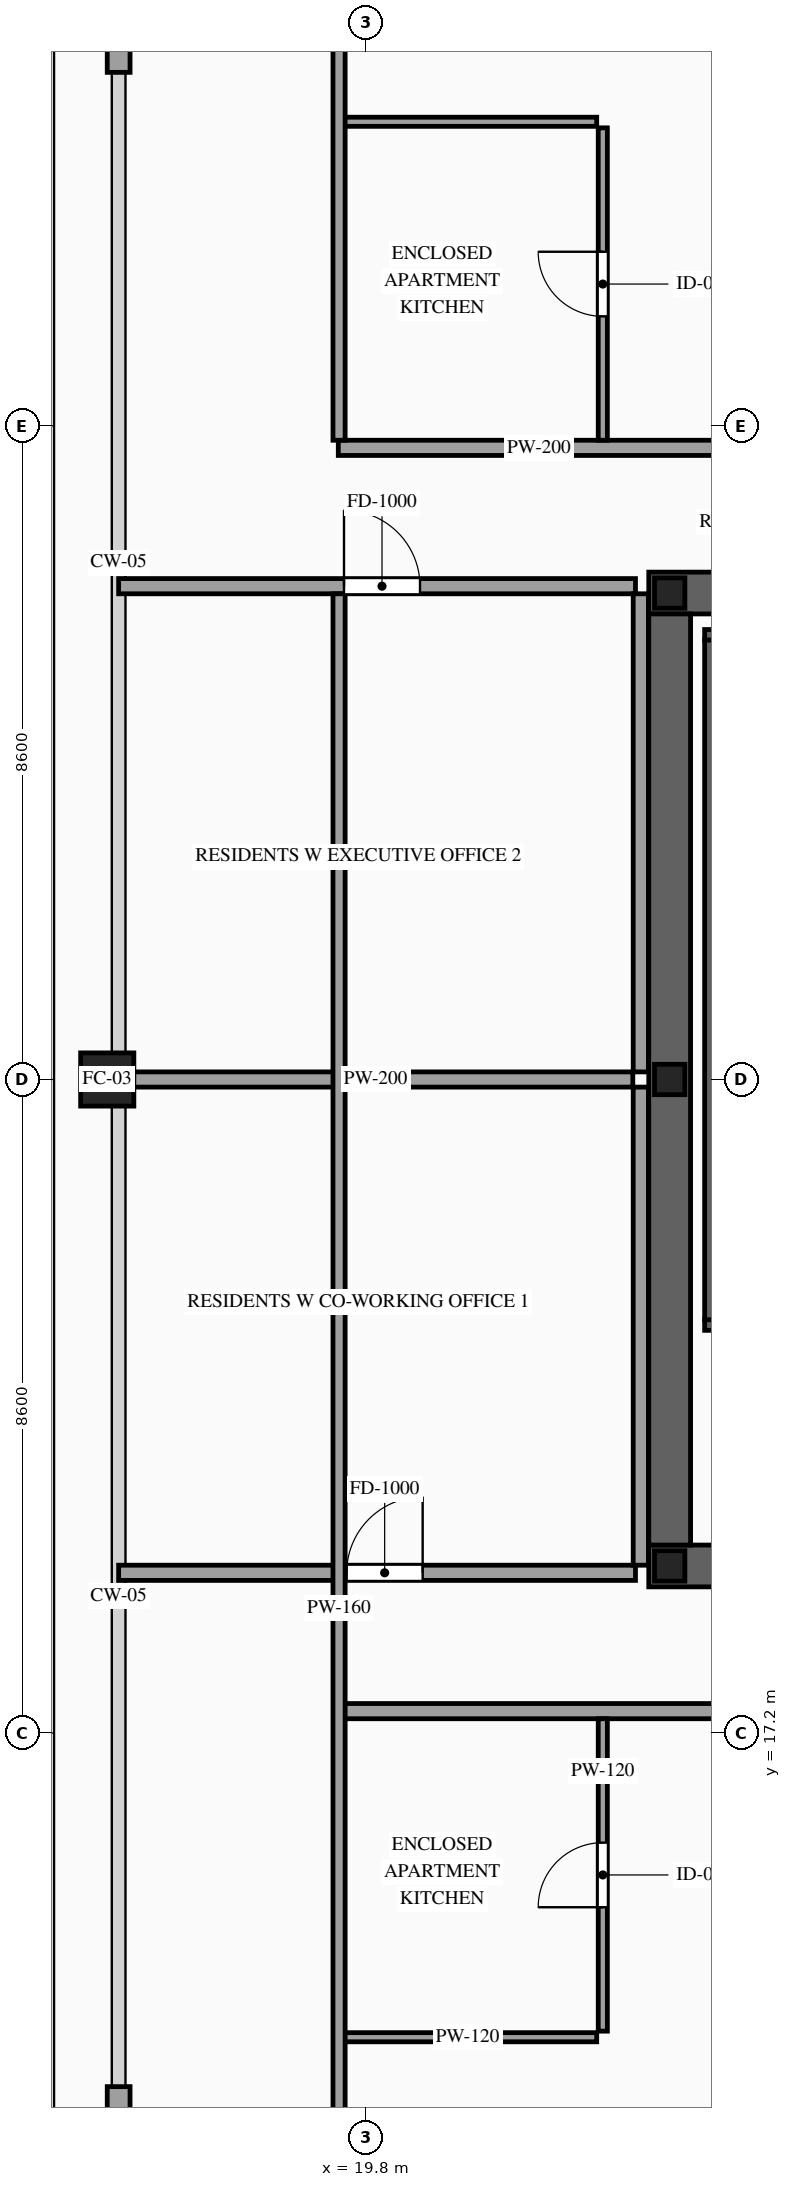
"""IFC4 building model, lengths in metres.
Left out: names, types, materials, properties, quantities, classifications, styles, units other than length and angle.
Written with IfcOpenShell. Run it as: python <this file> out.ifc"""

import sys

from ifc_helpers import new_model, si_unit, direction, frame, frame_2d, origin, origin_2d, place, context, subcontext, project, spatial, rectangle, hollow_rectangle, i_section, extrude, source, transform, mapped, element, fill, save


model = new_model("IFC4")
c1 = context("Model", 3, precision=1e-05, world=origin(), true_north=direction((0.0, 1.0)))
c2 = subcontext(c1, "Body", "Model", "MODEL_VIEW")
j1 = project(units=[si_unit("LENGTHUNIT", "METRE"), si_unit("PLANEANGLEUNIT", "RADIAN")], contexts=[c1])
p1 = place(None, origin())
s1 = spatial("IfcSite", under=j1, at=p1, CompositionType="ELEMENT")
p2 = place(p1, origin())
s2 = spatial("IfcBuilding", under=s1, at=p2, CompositionType="ELEMENT")
p3 = place(p2, frame((0.0, 0.0, 241.6)))
s3 = spatial("IfcBuildingStorey", under=s2, at=p3, CompositionType="ELEMENT", Elevation=241.6)
p4 = place(p3, frame((23.525, 19.4, 0.0), z_axis=(0.0, 0.0, 1.0), x_axis=(1.0, 0.0, 0.0)))
e1 = element("IfcWall", 1, at=p4, inside=s3, PredefinedType="SHEAR", context=c2, shape_type="SweptSolid", body=[
    extrude(rectangle(XDim=26.95, YDim=0.55, at=frame_2d((13.475, 0.0))), origin(), (0.0, 0.0, 1.0), 3.5),
])
p5 = place(p4, frame((1.925, 0.0, 0.0)))
e2 = element("IfcOpeningElement", 2, at=p5, cuts=e1, PredefinedType="OPENING", context=c2, shape_type="SweptSolid", body=[
    extrude(rectangle(XDim=1.1, YDim=2.2, at=frame_2d((0.55, 1.1))), frame((0.0, 0.29, 0.0), z_axis=(0.0, -1.0, 0.0), x_axis=(1.0, 0.0, 0.0)), (0.0, 0.0, 1.0), 0.58),
])
p6 = place(p4, frame((9.825, 0.0, 0.0)))
e3 = element("IfcOpeningElement", 3, at=p6, cuts=e1, PredefinedType="OPENING", context=c2, shape_type="SweptSolid", body=[
    extrude(rectangle(XDim=1.1, YDim=2.2, at=frame_2d((0.55, 1.1))), frame((0.0, 0.29, 0.0), z_axis=(0.0, -1.0, 0.0), x_axis=(1.0, 0.0, 0.0)), (0.0, 0.0, 1.0), 0.58),
])
p7 = place(p4, frame((23.025, 0.0, 0.0)))
e4 = element("IfcOpeningElement", 4, at=p7, cuts=e1, PredefinedType="OPENING", context=c2, shape_type="SweptSolid", body=[
    extrude(rectangle(XDim=1.1, YDim=2.2, at=frame_2d((0.55, 1.1))), frame((0.0, 0.29, 0.0), z_axis=(0.0, -1.0, 0.0), x_axis=(1.0, 0.0, 0.0)), (0.0, 0.0, 1.0), 0.58),
])
p8 = place(p4, frame((19.645, 0.0, 0.0)))
e5 = element("IfcOpeningElement", 5, at=p8, cuts=e1, PredefinedType="OPENING", context=c2, shape_type="SweptSolid", body=[
    extrude(rectangle(XDim=0.9, YDim=2.15, at=frame_2d((0.45, 1.075))), frame((0.0, 0.29, 0.0), z_axis=(0.0, -1.0, 0.0), x_axis=(1.0, 0.0, 0.0)), (0.0, 0.0, 1.0), 0.58),
])
p9 = place(p4, frame((18.205, 0.0, 0.0)))
e6 = element("IfcOpeningElement", 6, at=p9, cuts=e1, PredefinedType="OPENING", context=c2, shape_type="SweptSolid", body=[
    extrude(rectangle(XDim=0.9, YDim=2.15, at=frame_2d((0.45, 1.075))), frame((0.0, 0.29, 0.0), z_axis=(0.0, -1.0, 0.0), x_axis=(1.0, 0.0, 0.0)), (0.0, 0.0, 1.0), 0.58),
])
p10 = place(p3, frame((23.525, 32.2, 0.0), z_axis=(0.0, 0.0, 1.0), x_axis=(1.0, 0.0, 0.0)))
e7 = element("IfcWall", 7, at=p10, inside=s3, PredefinedType="SHEAR", context=c2, shape_type="SweptSolid", body=[
    extrude(rectangle(XDim=26.95, YDim=0.55, at=frame_2d((13.475, 0.0))), origin(), (0.0, 0.0, 1.0), 3.5),
])
p11 = place(p10, frame((4.545, 0.0, 0.0)))
e8 = element("IfcOpeningElement", 8, at=p11, cuts=e7, PredefinedType="OPENING", context=c2, shape_type="SweptSolid", body=[
    extrude(rectangle(XDim=0.9, YDim=2.15, at=frame_2d((0.45, 1.075))), frame((0.0, 0.29, 0.0), z_axis=(0.0, -1.0, 0.0), x_axis=(1.0, 0.0, 0.0)), (0.0, 0.0, 1.0), 0.58),
])
p12 = place(p10, frame((9.825, 0.0, 0.0)))
e9 = element("IfcOpeningElement", 9, at=p12, cuts=e7, PredefinedType="OPENING", context=c2, shape_type="SweptSolid", body=[
    extrude(rectangle(XDim=1.1, YDim=2.2, at=frame_2d((0.55, 1.1))), frame((0.0, 0.29, 0.0), z_axis=(0.0, -1.0, 0.0), x_axis=(1.0, 0.0, 0.0)), (0.0, 0.0, 1.0), 0.58),
])
p13 = place(p10, frame((15.675, 0.0, 0.0)))
e10 = element("IfcOpeningElement", 10, at=p13, cuts=e7, PredefinedType="OPENING", context=c2, shape_type="SweptSolid", body=[
    extrude(rectangle(XDim=1.1, YDim=2.2, at=frame_2d((0.55, 1.1))), frame((0.0, 0.29, 0.0), z_axis=(0.0, -1.0, 0.0), x_axis=(1.0, 0.0, 0.0)), (0.0, 0.0, 1.0), 0.58),
])
p14 = place(p10, frame((18.205, 0.0, 0.0)))
e11 = element("IfcOpeningElement", 11, at=p14, cuts=e7, PredefinedType="OPENING", context=c2, shape_type="SweptSolid", body=[
    extrude(rectangle(XDim=0.9, YDim=2.15, at=frame_2d((0.45, 1.075))), frame((0.0, 0.29, 0.0), z_axis=(0.0, -1.0, 0.0), x_axis=(1.0, 0.0, 0.0)), (0.0, 0.0, 1.0), 0.58),
])
p15 = place(p10, frame((19.645, 0.0, 0.0)))
e12 = element("IfcOpeningElement", 12, at=p15, cuts=e7, PredefinedType="OPENING", context=c2, shape_type="SweptSolid", body=[
    extrude(rectangle(XDim=0.9, YDim=2.15, at=frame_2d((0.45, 1.075))), frame((0.0, 0.29, 0.0), z_axis=(0.0, -1.0, 0.0), x_axis=(1.0, 0.0, 0.0)), (0.0, 0.0, 1.0), 0.58),
])
m1 = source(origin(), c2, "Body", "SweptSolid", [
    extrude(rectangle(XDim=12.25, YDim=0.55, at=frame_2d((6.125, 0.0))), origin(), (0.0, 0.0, 1.0), 3.5),
])
p16 = place(p3, frame((23.8, 19.675, 0.0), z_axis=(0.0, 0.0, 1.0), x_axis=(0.0, 1.0, 0.0)))
e13 = element("IfcWall", 13, at=p16, inside=s3, PredefinedType="SHEAR", context=c2, shape_type="MappedRepresentation", body=[
    mapped(m1, transform((0.0, 0.0, 0.0), scale=1.0)),
])
m2 = source(origin(), c2, "Body", "SweptSolid", [
    extrude(i_section(OverallWidth=0.4, OverallDepth=0.4, WebThickness=0.013, FlangeThickness=0.021, at=origin_2d()), origin(), (0.0, 0.0, 1.0), 3.5),
])
for number, where, z_axis, x_axis in (
    (14, (23.8, 19.4, 0.0), (0.0, 0.0, 1.0), (1.0, 0.0, 0.0)),
    (15, (23.8, 25.8, 0.0), (0.0, 0.0, 1.0), (1.0, 0.0, 0.0)),
    (16, (23.8, 32.2, 0.0), (0.0, 0.0, 1.0), (1.0, 0.0, 0.0)),
):
    element("IfcColumn", number, at=place(p3, frame(where, z_axis=z_axis, x_axis=x_axis)), inside=s3, PredefinedType="COLUMN", context=c2, shape_type="MappedRepresentation", body=[
        mapped(m2, transform((0.0, 0.0, 0.0), scale=1.0)),
    ])
m3 = source(origin(), c2, "Body", "SweptSolid", [
    extrude(hollow_rectangle(XDim=0.7, YDim=0.7, WallThickness=0.032, at=origin_2d()), origin(), (0.0, 0.0, 1.0), 3.5),
])
p17 = place(p3, frame((16.4, 25.8, 0.0), z_axis=(0.0, 0.0, 1.0), x_axis=(1.0, 0.0, 0.0)))
e17 = element("IfcColumn", 17, at=p17, inside=s3, PredefinedType="COLUMN", context=c2, shape_type="MappedRepresentation", body=[
    mapped(m3, transform((0.0, 0.0, 0.0), scale=1.0)),
])
m4 = source(origin(), c2, "Body", "SweptSolid", [
    extrude(rectangle(XDim=3.15, YDim=0.3, at=frame_2d((1.575, 0.0))), origin(), (0.0, 0.0, 1.0), 2.835),
])
p18 = place(p3, frame((16.55, 9.4, 0.0), z_axis=(0.0, 0.0, 1.0), x_axis=(0.0, 1.0, 0.0)))
e18 = element("IfcWall", 18, at=p18, inside=s3, PredefinedType="SOLIDWALL", context=c2, shape_type="MappedRepresentation", body=[
    mapped(m4, transform((0.0, 0.0, 0.0), scale=1.0)),
])
m5 = source(origin(), c2, "Body", "SweptSolid", [
    extrude(rectangle(XDim=3.15, YDim=0.3, at=frame_2d((1.575, 0.0))), origin(), (0.0, 0.0, 1.0), 2.835),
])
p19 = place(p3, frame((16.55, 39.05, 0.0), z_axis=(0.0, 0.0, 1.0), x_axis=(0.0, 1.0, 0.0)))
e19 = element("IfcWall", 19, at=p19, inside=s3, PredefinedType="SOLIDWALL", context=c2, shape_type="MappedRepresentation", body=[
    mapped(m5, transform((0.0, 0.0, 0.0), scale=1.0)),
])
p20 = place(p3, frame((24.26, 22.57, 0.0), z_axis=(0.0, 0.0, 1.0), x_axis=(1.0, 0.0, 0.0)))
e20 = element("IfcWall", 20, at=p20, inside=s3, PredefinedType="SOLIDWALL", context=c2, shape_type="SweptSolid", body=[
    extrude(rectangle(XDim=3.28, YDim=0.14, at=frame_2d((1.64, 0.0))), origin(), (0.0, 0.0, 1.0), 3.28),
])
p21 = place(p20, frame((1.09, 0.0, 0.0)))
e21 = element("IfcOpeningElement", 21, at=p21, cuts=e20, PredefinedType="OPENING", context=c2, shape_type="SweptSolid", body=[
    extrude(rectangle(XDim=1.1, YDim=2.2, at=frame_2d((0.55, 1.1))), frame((0.0, 0.085, 0.0), z_axis=(0.0, -1.0, 0.0), x_axis=(1.0, 0.0, 0.0)), (0.0, 0.0, 1.0), 0.17),
])
m6 = source(origin(), c2, "Body", "SweptSolid", [
    extrude(rectangle(XDim=3.28, YDim=0.14, at=frame_2d((1.64, 0.0))), origin(), (0.0, 0.0, 1.0), 3.28),
])
p22 = place(p3, frame((24.26, 31.65, 0.0), z_axis=(0.0, 0.0, 1.0), x_axis=(1.0, 0.0, 0.0)))
e22 = element("IfcWall", 22, at=p22, inside=s3, PredefinedType="SOLIDWALL", context=c2, shape_type="MappedRepresentation", body=[
    mapped(m6, transform((0.0, 0.0, 0.0), scale=1.0)),
])
m7 = source(origin(), c2, "Body", "SweptSolid", [
    extrude(rectangle(XDim=8.94, YDim=0.14, at=frame_2d((4.47, 0.0))), origin(), (0.0, 0.0, 1.0), 3.28),
])
p23 = place(p3, frame((24.33, 22.64, 0.0), z_axis=(0.0, 0.0, 1.0), x_axis=(0.0, 1.0, 0.0)))
e23 = element("IfcWall", 23, at=p23, inside=s3, PredefinedType="SOLIDWALL", context=c2, shape_type="MappedRepresentation", body=[
    mapped(m7, transform((0.0, 0.0, 0.0), scale=1.0)),
])
p24 = place(p3, frame((19.44, 17.49, 0.0), z_axis=(0.0, 0.0, 1.0), x_axis=(1.0, 0.0, 0.0)))
e24 = element("IfcWall", 24, at=p24, inside=s3, PredefinedType="PARTITIONING", context=c2, shape_type="SweptSolid", body=[
    extrude(rectangle(XDim=11.51, YDim=0.2, at=frame_2d((5.755, 0.0))), origin(), (0.0, 0.0, 1.0), 3.28),
])
p25 = place(p24, frame((5.355, 0.0, 0.0)))
e25 = element("IfcOpeningElement", 25, at=p25, cuts=e24, PredefinedType="OPENING", context=c2, shape_type="SweptSolid", body=[
    extrude(rectangle(XDim=1.0, YDim=2.2, at=frame_2d((0.5, 1.1))), frame((0.0, 0.115, 0.0), z_axis=(0.0, -1.0, 0.0), x_axis=(1.0, 0.0, 0.0)), (0.0, 0.0, 1.0), 0.23),
])
m8 = source(origin(), c2, "Body", "SweptSolid", [
    extrude(rectangle(XDim=3.4, YDim=0.12, at=frame_2d((1.7, 0.0))), origin(), (0.0, 0.0, 1.0), 3.28),
])
p26 = place(p3, frame((19.44, 13.2, 0.0), z_axis=(0.0, 0.0, 1.0), x_axis=(1.0, 0.0, 0.0)))
e26 = element("IfcWall", 26, at=p26, inside=s3, PredefinedType="PARTITIONING", context=c2, shape_type="MappedRepresentation", body=[
    mapped(m8, transform((0.0, 0.0, 0.0), scale=1.0)),
])
p27 = place(p3, frame((22.92, 13.28, 0.0), z_axis=(0.0, 0.0, 1.0), x_axis=(0.0, 1.0, 0.0)))
e27 = element("IfcWall", 27, at=p27, inside=s3, PredefinedType="PARTITIONING", context=c2, shape_type="SweptSolid", body=[
    extrude(rectangle(XDim=4.11, YDim=0.12, at=frame_2d((2.055, 0.0))), origin(), (0.0, 0.0, 1.0), 3.28),
])
p28 = place(p27, frame((1.63, 0.0, 0.0)))
e28 = element("IfcOpeningElement", 28, at=p28, cuts=e27, PredefinedType="OPENING", context=c2, shape_type="SweptSolid", body=[
    extrude(rectangle(XDim=0.85, YDim=2.1, at=frame_2d((0.425, 1.05))), frame((0.0, 0.075, 0.0), z_axis=(0.0, -1.0, 0.0), x_axis=(1.0, 0.0, 0.0)), (0.0, 0.0, 1.0), 0.15),
])
p29 = place(p3, frame((19.44, 34.11, 0.0), z_axis=(0.0, 0.0, 1.0), x_axis=(1.0, 0.0, 0.0)))
e29 = element("IfcWall", 29, at=p29, inside=s3, PredefinedType="PARTITIONING", context=c2, shape_type="SweptSolid", body=[
    extrude(rectangle(XDim=11.861, YDim=0.2, at=frame_2d((5.931, 0.0))), origin(), (0.0, 0.0, 1.0), 3.28),
])
p30 = place(p29, frame((5.531, 0.0, 0.0)))
e30 = element("IfcOpeningElement", 30, at=p30, cuts=e29, PredefinedType="OPENING", context=c2, shape_type="SweptSolid", body=[
    extrude(rectangle(XDim=1.0, YDim=2.2, at=frame_2d((0.5, 1.1))), frame((0.0, 0.115, 0.0), z_axis=(0.0, -1.0, 0.0), x_axis=(1.0, 0.0, 0.0)), (0.0, 0.0, 1.0), 0.23),
])
p31 = place(p3, frame((19.44, 38.4, 0.0), z_axis=(0.0, 0.0, 1.0), x_axis=(1.0, 0.0, 0.0)))
e31 = element("IfcWall", 31, at=p31, inside=s3, PredefinedType="PARTITIONING", context=c2, shape_type="MappedRepresentation", body=[
    mapped(m8, transform((0.0, 0.0, 0.0), scale=1.0)),
])
p32 = place(p3, frame((22.92, 34.21, 0.0), z_axis=(0.0, 0.0, 1.0), x_axis=(0.0, 1.0, 0.0)))
e32 = element("IfcWall", 32, at=p32, inside=s3, PredefinedType="PARTITIONING", context=c2, shape_type="SweptSolid", body=[
    extrude(rectangle(XDim=4.11, YDim=0.12, at=frame_2d((2.055, 0.0))), origin(), (0.0, 0.0, 1.0), 3.28),
])
p33 = place(p32, frame((1.63, 0.0, 0.0)))
e33 = element("IfcOpeningElement", 33, at=p33, cuts=e32, PredefinedType="OPENING", context=c2, shape_type="SweptSolid", body=[
    extrude(rectangle(XDim=0.85, YDim=2.1, at=frame_2d((0.425, 1.05))), frame((0.0, 0.075, 0.0), z_axis=(0.0, -1.0, 0.0), x_axis=(1.0, 0.0, 0.0)), (0.0, 0.0, 1.0), 0.15),
])
m9 = source(origin(), c2, "Body", "SweptSolid", [
    extrude(rectangle(XDim=11.89, YDim=0.16, at=frame_2d((5.945, 0.0))), origin(), (0.0, 0.0, 1.0), 3.28),
])
p34 = place(p3, frame((19.45, 34.21, 0.0), z_axis=(0.0, 0.0, 1.0), x_axis=(0.0, 1.0, 0.0)))
e34 = element("IfcWall", 34, at=p34, inside=s3, PredefinedType="PARTITIONING", context=c2, shape_type="MappedRepresentation", body=[
    mapped(m9, transform((0.0, 0.0, 0.0), scale=1.0)),
])
p35 = place(p3, frame((16.55, 19.31, 0.0), z_axis=(0.0, 0.0, 1.0), x_axis=(1.0, 0.0, 0.0)))
e35 = element("IfcWall", 35, at=p35, inside=s3, PredefinedType="PARTITIONING", context=c2, shape_type="SweptSolid", body=[
    extrude(rectangle(XDim=6.8, YDim=0.2, at=frame_2d((3.4, 0.0))), origin(), (0.0, 0.0, 1.0), 2.825),
])
p36 = place(p35, frame((3.0, 0.0, 0.0)))
e36 = element("IfcOpeningElement", 36, at=p36, cuts=e35, PredefinedType="OPENING", context=c2, shape_type="SweptSolid", body=[
    extrude(rectangle(XDim=1.0, YDim=2.2, at=frame_2d((0.5, 1.1))), frame((0.0, 0.115, 0.0), z_axis=(0.0, -1.0, 0.0), x_axis=(1.0, 0.0, 0.0)), (0.0, 0.0, 1.0), 0.23),
])
m10 = source(origin(), c2, "Body", "SweptSolid", [
    extrude(rectangle(XDim=6.765, YDim=0.2, at=frame_2d((3.382, 0.0))), origin(), (0.0, 0.0, 1.0), 2.787),
])
p37 = place(p3, frame((16.55, 25.8, 0.0), z_axis=(0.0, 0.0, 1.0), x_axis=(1.0, 0.0, 0.0)))
e37 = element("IfcWall", 37, at=p37, inside=s3, PredefinedType="PARTITIONING", context=c2, shape_type="MappedRepresentation", body=[
    mapped(m10, transform((0.0, 0.0, 0.0), scale=1.0)),
])
m11 = source(origin(), c2, "Body", "SweptSolid", [
    extrude(rectangle(XDim=6.29, YDim=0.2, at=frame_2d((3.145, 0.0))), origin(), (0.0, 0.0, 1.0), 3.28),
])
p38 = place(p3, frame((23.42, 19.41, 0.0), z_axis=(0.0, 0.0, 1.0), x_axis=(0.0, 1.0, 0.0)))
e38 = element("IfcWall", 38, at=p38, inside=s3, PredefinedType="PARTITIONING", context=c2, shape_type="MappedRepresentation", body=[
    mapped(m11, transform((0.0, 0.0, 0.0), scale=1.0)),
])
p39 = place(p3, frame((16.55, 32.29, 0.0), z_axis=(0.0, 0.0, 1.0), x_axis=(1.0, 0.0, 0.0)))
e39 = element("IfcWall", 39, at=p39, inside=s3, PredefinedType="PARTITIONING", context=c2, shape_type="SweptSolid", body=[
    extrude(rectangle(XDim=6.8, YDim=0.2, at=frame_2d((3.4, 0.0))), origin(), (0.0, 0.0, 1.0), 2.825),
])
p40 = place(p39, frame((2.965, 0.0, 0.0)))
e40 = element("IfcOpeningElement", 40, at=p40, cuts=e39, PredefinedType="OPENING", context=c2, shape_type="SweptSolid", body=[
    extrude(rectangle(XDim=1.0, YDim=2.2, at=frame_2d((0.5, 1.1))), frame((0.0, 0.115, 0.0), z_axis=(0.0, -1.0, 0.0), x_axis=(1.0, 0.0, 0.0)), (0.0, 0.0, 1.0), 0.23),
])
m12 = source(origin(), c2, "Body", "SweptSolid", [
    extrude(rectangle(XDim=26.69, YDim=0.16, at=frame_2d((13.345, 0.0))), origin(), (0.0, 0.0, 1.0), 3.28),
])
p41 = place(p3, frame((19.45, 5.5, 0.0), z_axis=(0.0, 0.0, 1.0), x_axis=(0.0, 1.0, 0.0)))
e41 = element("IfcWall", 41, at=p41, inside=s3, PredefinedType="PARTITIONING", context=c2, shape_type="MappedRepresentation", body=[
    mapped(m12, transform((0.0, 0.0, 0.0), scale=1.0)),
])
p42 = place(p3, frame((23.42, 25.9, 0.0), z_axis=(0.0, 0.0, 1.0), x_axis=(0.0, 1.0, 0.0)))
e42 = element("IfcWall", 42, at=p42, inside=s3, PredefinedType="PARTITIONING", context=c2, shape_type="MappedRepresentation", body=[
    mapped(m11, transform((0.0, 0.0, 0.0), scale=1.0)),
])
m13 = source(origin(), c2, "Body", "SweptSolid", [
    extrude(rectangle(XDim=0.85, YDim=2.1, at=frame_2d((0.425, 1.05))), frame((0.0, 0.025, 0.0), z_axis=(0.0, -1.0, 0.0), x_axis=(1.0, 0.0, 0.0)), (0.0, 0.0, 1.0), 0.05),
])
p43 = place(p28, origin())
e43 = element("IfcDoor", 43, at=p43, inside=s3, OperationType="SINGLE_SWING_LEFT", PredefinedType="DOOR", context=c2, shape_type="MappedRepresentation", body=[
    mapped(m13, transform((0.0, 0.0, 0.0), scale=1.0)),
])
fill(e28, e43)
p44 = place(p33, origin())
e44 = element("IfcDoor", 44, at=p44, inside=s3, OperationType="SINGLE_SWING_RIGHT", PredefinedType="DOOR", context=c2, shape_type="MappedRepresentation", body=[
    mapped(m13, transform((0.0, 0.0, 0.0), scale=1.0)),
])
fill(e33, e44)
m14 = source(origin(), c2, "Body", "SweptSolid", [
    extrude(rectangle(XDim=1.0, YDim=2.2, at=frame_2d((0.5, 1.1))), frame((0.0, 0.025, 0.0), z_axis=(0.0, -1.0, 0.0), x_axis=(1.0, 0.0, 0.0)), (0.0, 0.0, 1.0), 0.05),
])
p45 = place(p36, origin())
e45 = element("IfcDoor", 45, at=p45, inside=s3, OperationType="SINGLE_SWING_RIGHT", PredefinedType="DOOR", context=c2, shape_type="MappedRepresentation", body=[
    mapped(m14, transform((0.0, 0.0, 0.0), scale=1.0)),
])
fill(e36, e45)
p46 = place(p40, origin())
e46 = element("IfcDoor", 46, at=p46, inside=s3, OperationType="SINGLE_SWING_LEFT", PredefinedType="DOOR", context=c2, shape_type="MappedRepresentation", body=[
    mapped(m14, transform((0.0, 0.0, 0.0), scale=1.0)),
])
fill(e40, e46)
save(model, sys.argv[1])
